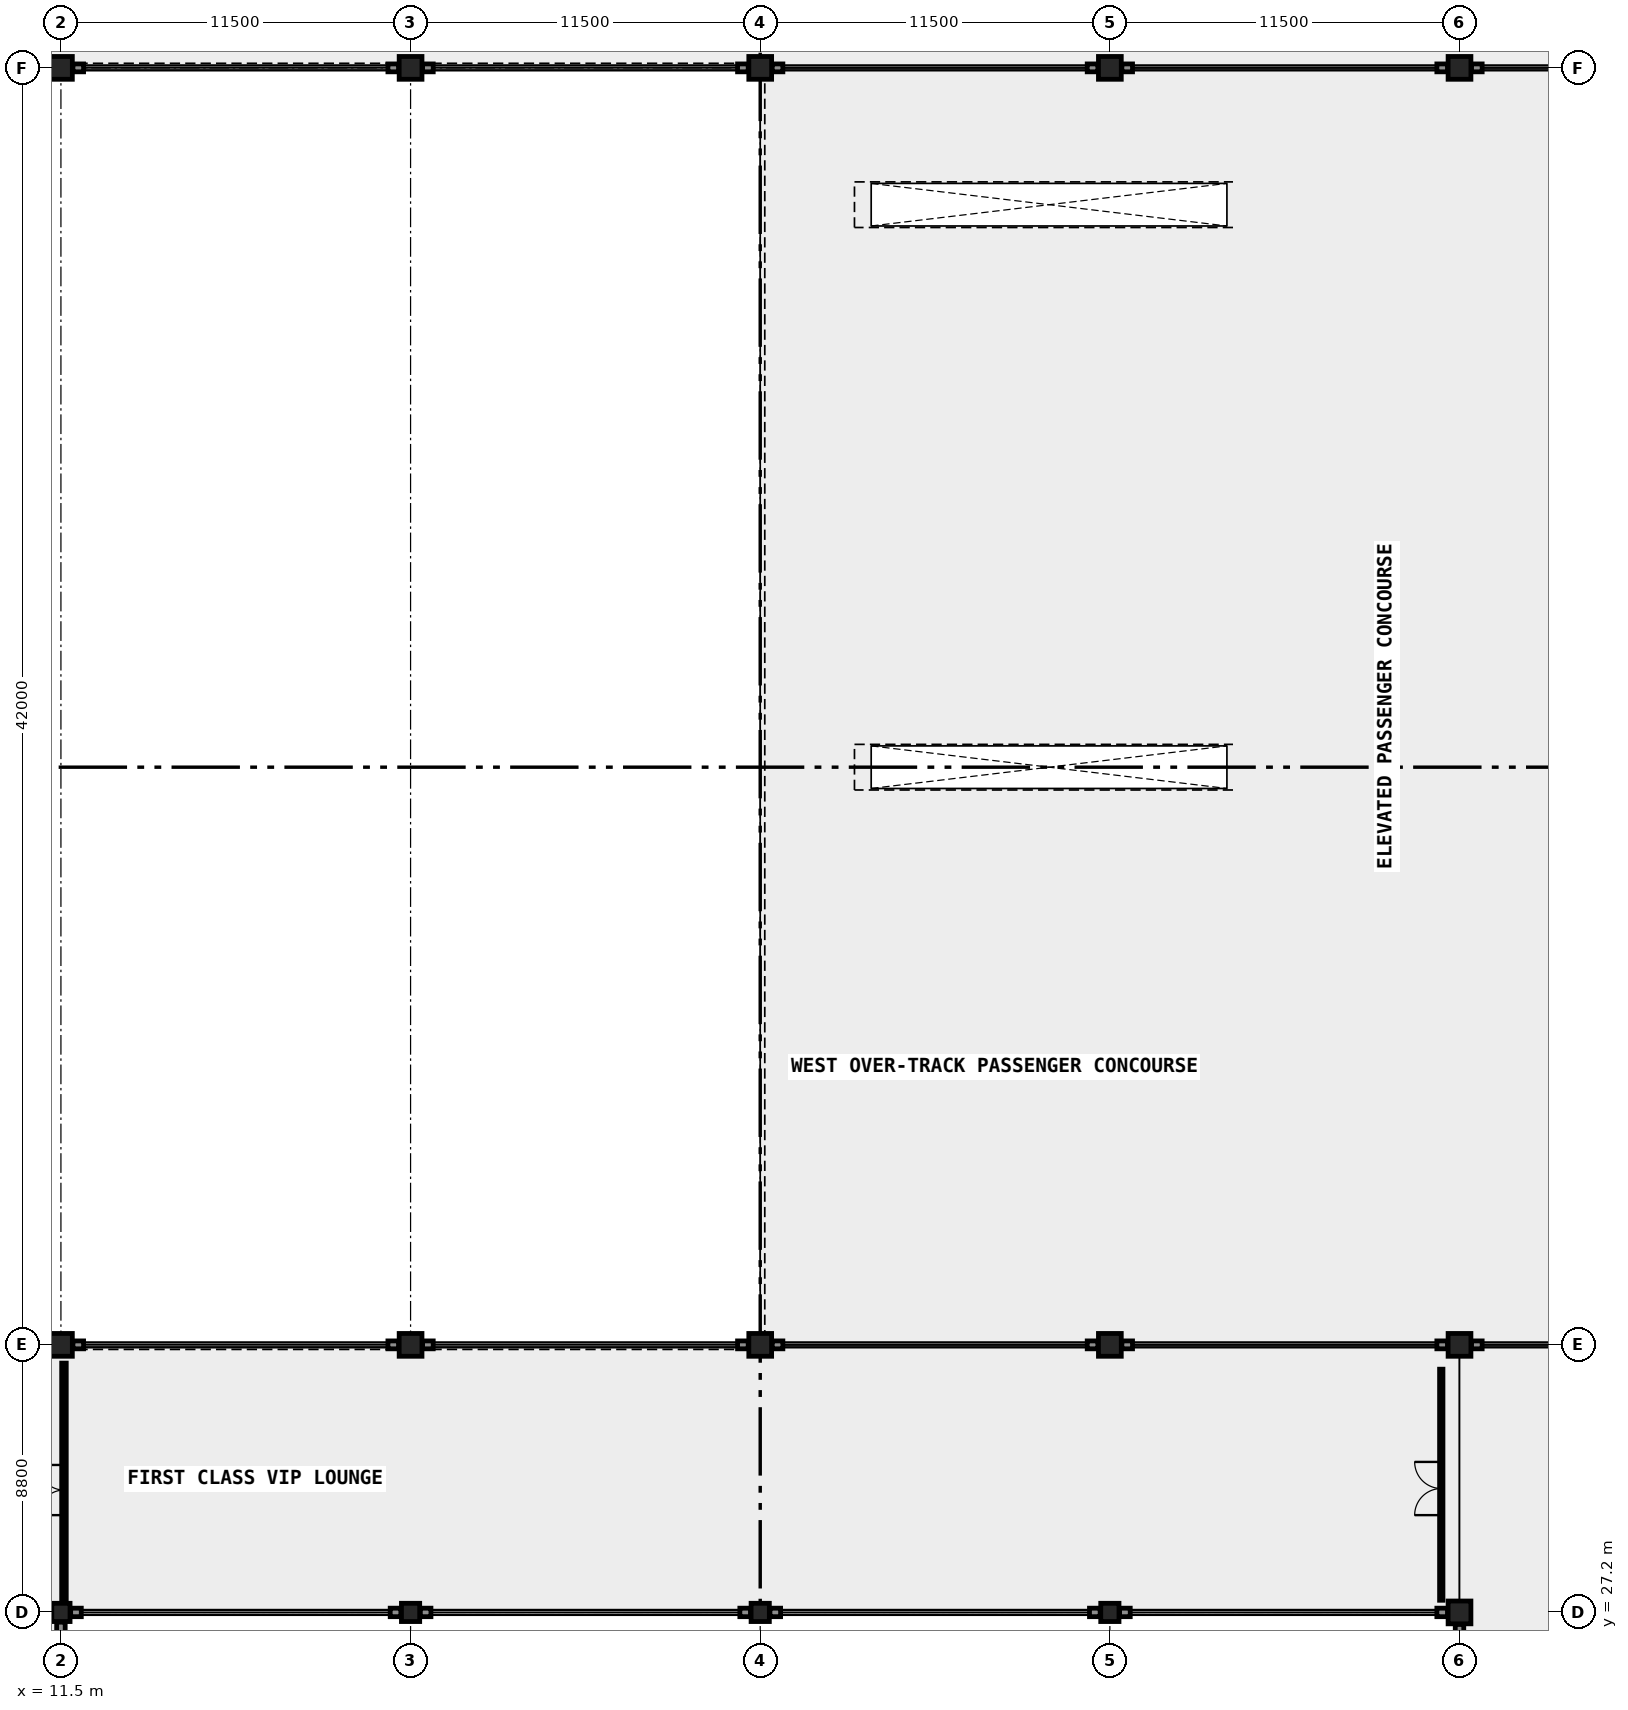
"""IFC4 building model, lengths in metres.
Left out: names, types, materials, properties, quantities, classifications, styles, units other than length and angle.
Written with IfcOpenShell. Run it as: python <this file> out.ifc"""

import sys

from ifc_helpers import new_model, si_unit, direction, frame, frame_2d, origin, origin_2d, place, context, subcontext, project, spatial, rectangle, circle, extrude, element, fill, save


model = new_model("IFC4")
c1 = context("Model", 3, precision=1e-05, world=origin(), true_north=direction((0.0, 1.0)))
c2 = subcontext(c1, "Body", "Model", "MODEL_VIEW")
j1 = project(units=[si_unit("LENGTHUNIT", "METRE"), si_unit("PLANEANGLEUNIT", "RADIAN")], contexts=[c1])
p1 = place(None, origin())
s1 = spatial("IfcSite", under=j1, at=p1, CompositionType="ELEMENT")
p2 = place(p1, origin())
s2 = spatial("IfcBuilding", under=s1, at=p2, CompositionType="ELEMENT")
p3 = place(p2, frame((0.0, 0.0, 8.4)))
s3 = spatial("IfcBuildingStorey", under=s2, at=p3, CompositionType="ELEMENT", Elevation=8.4)
p4 = place(p3, frame((11.5, 27.2, 0.0), z_axis=(0.0, 0.0, 1.0), x_axis=(1.0, 0.0, 0.0)))
e1 = element("IfcColumn", 1, at=p4, inside=s3, PredefinedType="COLUMN", context=c2, shape_type="SweptSolid", body=[
    extrude(rectangle(XDim=0.6, YDim=0.6, at=origin_2d()), origin(), (0.0, 0.0, 1.0), 5.4),
])
for number, where, z_axis, x_axis in (
    (2, (11.5, 36.0, 0.0), (0.0, 0.0, 1.0), (1.0, 0.0, 0.0)),
    (3, (11.5, 78.0, 0.0), (0.0, 0.0, 1.0), (1.0, 0.0, 0.0)),
):
    element("IfcColumn", number, at=place(p3, frame(where, z_axis=z_axis, x_axis=x_axis)), inside=s3, PredefinedType="COLUMN", context=c2, shape_type="SweptSolid", body=[
        extrude(rectangle(XDim=0.75, YDim=0.75, at=origin_2d()), origin(), (0.0, 0.0, 1.0), 5.4),
    ])
p5 = place(p3, frame((23.0, 27.2, 0.0), z_axis=(0.0, 0.0, 1.0), x_axis=(1.0, 0.0, 0.0)))
e4 = element("IfcColumn", 4, at=p5, inside=s3, PredefinedType="COLUMN", context=c2, shape_type="SweptSolid", body=[
    extrude(rectangle(XDim=0.6, YDim=0.6, at=origin_2d()), origin(), (0.0, 0.0, 1.0), 5.4),
])
for number, where, z_axis, x_axis in (
    (5, (23.0, 36.0, 0.0), (0.0, 0.0, 1.0), (1.0, 0.0, 0.0)),
    (6, (23.0, 78.0, 0.0), (0.0, 0.0, 1.0), (1.0, 0.0, 0.0)),
):
    element("IfcColumn", number, at=place(p3, frame(where, z_axis=z_axis, x_axis=x_axis)), inside=s3, PredefinedType="COLUMN", context=c2, shape_type="SweptSolid", body=[
        extrude(rectangle(XDim=0.75, YDim=0.75, at=origin_2d()), origin(), (0.0, 0.0, 1.0), 5.4),
    ])
p6 = place(p3, frame((34.5, 27.2, 0.0), z_axis=(0.0, 0.0, 1.0), x_axis=(1.0, 0.0, 0.0)))
e7 = element("IfcColumn", 7, at=p6, inside=s3, PredefinedType="COLUMN", context=c2, shape_type="SweptSolid", body=[
    extrude(rectangle(XDim=0.6, YDim=0.6, at=origin_2d()), origin(), (0.0, 0.0, 1.0), 5.4),
])
for number, where, z_axis, x_axis in (
    (8, (34.5, 36.0, 0.0), (0.0, 0.0, 1.0), (1.0, 0.0, 0.0)),
    (9, (34.5, 78.0, 0.0), (0.0, 0.0, 1.0), (1.0, 0.0, 0.0)),
):
    element("IfcColumn", number, at=place(p3, frame(where, z_axis=z_axis, x_axis=x_axis)), inside=s3, PredefinedType="COLUMN", context=c2, shape_type="SweptSolid", body=[
        extrude(rectangle(XDim=0.75, YDim=0.75, at=origin_2d()), origin(), (0.0, 0.0, 1.0), 5.4),
    ])
p7 = place(p3, frame((46.0, 27.2, 0.0), z_axis=(0.0, 0.0, 1.0), x_axis=(1.0, 0.0, 0.0)))
e10 = element("IfcColumn", 10, at=p7, inside=s3, PredefinedType="COLUMN", context=c2, shape_type="SweptSolid", body=[
    extrude(rectangle(XDim=0.6, YDim=0.6, at=origin_2d()), origin(), (0.0, 0.0, 1.0), 5.4),
])
for number, where, z_axis, x_axis in (
    (11, (46.0, 36.0, 0.0), (0.0, 0.0, 1.0), (1.0, 0.0, 0.0)),
    (12, (46.0, 78.0, 0.0), (0.0, 0.0, 1.0), (1.0, 0.0, 0.0)),
):
    element("IfcColumn", number, at=place(p3, frame(where, z_axis=z_axis, x_axis=x_axis)), inside=s3, PredefinedType="COLUMN", context=c2, shape_type="SweptSolid", body=[
        extrude(rectangle(XDim=0.75, YDim=0.75, at=origin_2d()), origin(), (0.0, 0.0, 1.0), 5.4),
    ])
p8 = place(p3, frame((57.5, 27.2, 0.0), z_axis=(0.0, 0.0, 1.0), x_axis=(1.0, 0.0, 0.0)))
e13 = element("IfcColumn", 13, at=p8, inside=s3, PredefinedType="COLUMN", context=c2, shape_type="SweptSolid", body=[
    extrude(circle(Radius=0.375, at=origin_2d()), origin(), (0.0, 0.0, 1.0), 5.4),
])
for number, where, z_axis, x_axis in (
    (14, (57.5, 36.0, 0.0), (0.0, 0.0, 1.0), (1.0, 0.0, 0.0)),
    (15, (57.5, 78.0, 0.0), (0.0, 0.0, 1.0), (1.0, 0.0, 0.0)),
):
    element("IfcColumn", number, at=place(p3, frame(where, z_axis=z_axis, x_axis=x_axis)), inside=s3, PredefinedType="COLUMN", context=c2, shape_type="SweptSolid", body=[
        extrude(rectangle(XDim=0.75, YDim=0.75, at=origin_2d()), origin(), (0.0, 0.0, 1.0), 5.4),
    ])
p9 = place(p3, frame((11.5, 17.92, 0.0), z_axis=(0.0, 0.0, 1.0), x_axis=(0.0, 1.0, 0.0)))
e16 = element("IfcWall", 16, at=p9, inside=s3, PredefinedType="SOLIDWALL", context=c2, shape_type="SweptSolid", body=[
    extrude(rectangle(XDim=8.96, YDim=0.28, at=frame_2d((4.48, 0.0))), origin(), (0.0, 0.0, 1.0), 4.25),
])
p10 = place(p9, frame((1.32, 0.0, 0.85)))
e17 = element("IfcOpeningElement", 17, at=p10, cuts=e16, PredefinedType="OPENING", context=c2, shape_type="SweptSolid", body=[
    extrude(rectangle(XDim=2.5, YDim=2.2, at=frame_2d((1.25, 1.1))), frame((0.0, 0.15, 0.0), z_axis=(0.0, -1.0, 0.0), x_axis=(1.0, 0.0, 0.0)), (0.0, 0.0, 1.0), 0.3),
])
p11 = place(p9, frame((5.14, 0.0, 0.85)))
e18 = element("IfcOpeningElement", 18, at=p11, cuts=e16, PredefinedType="OPENING", context=c2, shape_type="SweptSolid", body=[
    extrude(rectangle(XDim=2.5, YDim=2.2, at=frame_2d((1.25, 1.1))), frame((0.0, 0.15, 0.0), z_axis=(0.0, -1.0, 0.0), x_axis=(1.0, 0.0, 0.0)), (0.0, 0.0, 1.0), 0.3),
])
for number, where, z_axis, x_axis in (
    (19, (11.82, 27.2, 0.0), (0.0, 0.0, 1.0), (1.0, 0.0, 0.0)),
    (20, (22.33, 27.2, 0.0), (0.0, 0.0, 1.0), (1.0, 0.0, 0.0)),
    (21, (23.32, 27.2, 0.0), (0.0, 0.0, 1.0), (1.0, 0.0, 0.0)),
    (22, (33.83, 27.2, 0.0), (0.0, 0.0, 1.0), (1.0, 0.0, 0.0)),
    (23, (34.82, 27.2, 0.0), (0.0, 0.0, 1.0), (1.0, 0.0, 0.0)),
    (24, (45.33, 27.2, 0.0), (0.0, 0.0, 1.0), (1.0, 0.0, 0.0)),
    (25, (46.32, 27.2, 0.0), (0.0, 0.0, 1.0), (1.0, 0.0, 0.0)),
):
    element("IfcWall", number, at=place(p3, frame(where, z_axis=z_axis, x_axis=x_axis)), inside=s3, PredefinedType="SOLIDWALL", context=c2, shape_type="SweptSolid", body=[
        extrude(rectangle(XDim=0.35, YDim=0.28, at=frame_2d((0.175, 0.0))), origin(), (0.0, 0.0, 1.0), 5.14),
    ])
p12 = place(p3, frame((56.755, 27.2, 0.0), z_axis=(0.0, 0.0, 1.0), x_axis=(1.0, 0.0, 0.0)))
e26 = element("IfcWall", 26, at=p12, inside=s3, PredefinedType="SOLIDWALL", context=c2, shape_type="SweptSolid", body=[
    extrude(rectangle(XDim=0.35, YDim=0.28, at=frame_2d((0.175, 0.0))), origin(), (0.0, 0.0, 1.0), 5.14),
])
p13 = place(p3, frame((57.5, 17.995, 0.0), z_axis=(0.0, 0.0, 1.0), x_axis=(0.0, 1.0, 0.0)))
e27 = element("IfcWall", 27, at=p13, inside=s3, PredefinedType="SOLIDWALL", context=c2, shape_type="SweptSolid", body=[
    extrude(rectangle(XDim=8.81, YDim=0.28, at=frame_2d((4.405, 0.0))), origin(), (0.0, 0.0, 1.0), 4.25),
])
p14 = place(p13, frame((2.237, 0.0, 0.85)))
e28 = element("IfcOpeningElement", 28, at=p14, cuts=e27, PredefinedType="OPENING", context=c2, shape_type="SweptSolid", body=[
    extrude(rectangle(XDim=1.05, YDim=2.05, at=frame_2d((0.525, 1.025))), frame((0.0, 0.15, 0.0), z_axis=(0.0, -1.0, 0.0), x_axis=(1.0, 0.0, 0.0)), (0.0, 0.0, 1.0), 0.3),
])
p15 = place(p13, frame((5.523, 0.0, 0.85)))
e29 = element("IfcOpeningElement", 29, at=p15, cuts=e27, PredefinedType="OPENING", context=c2, shape_type="SweptSolid", body=[
    extrude(rectangle(XDim=1.05, YDim=2.05, at=frame_2d((0.525, 1.025))), frame((0.0, 0.15, 0.0), z_axis=(0.0, -1.0, 0.0), x_axis=(1.0, 0.0, 0.0)), (0.0, 0.0, 1.0), 0.3),
])
for number, where, z_axis, x_axis in (
    (30, (11.895, 36.0, 0.0), (0.0, 0.0, 1.0), (1.0, 0.0, 0.0)),
    (31, (22.255, 36.0, 0.0), (0.0, 0.0, 1.0), (1.0, 0.0, 0.0)),
    (32, (11.895, 78.0, 0.0), (0.0, 0.0, 1.0), (1.0, 0.0, 0.0)),
    (33, (22.255, 78.0, 0.0), (0.0, 0.0, 1.0), (1.0, 0.0, 0.0)),
    (34, (23.395, 36.0, 0.0), (0.0, 0.0, 1.0), (1.0, 0.0, 0.0)),
    (35, (33.755, 36.0, 0.0), (0.0, 0.0, 1.0), (1.0, 0.0, 0.0)),
    (36, (23.395, 78.0, 0.0), (0.0, 0.0, 1.0), (1.0, 0.0, 0.0)),
    (37, (33.755, 78.0, 0.0), (0.0, 0.0, 1.0), (1.0, 0.0, 0.0)),
    (38, (34.895, 36.0, 0.0), (0.0, 0.0, 1.0), (1.0, 0.0, 0.0)),
    (39, (45.255, 36.0, 0.0), (0.0, 0.0, 1.0), (1.0, 0.0, 0.0)),
    (40, (34.895, 78.0, 0.0), (0.0, 0.0, 1.0), (1.0, 0.0, 0.0)),
    (41, (45.255, 78.0, 0.0), (0.0, 0.0, 1.0), (1.0, 0.0, 0.0)),
    (42, (46.395, 36.0, 0.0), (0.0, 0.0, 1.0), (1.0, 0.0, 0.0)),
    (43, (56.755, 36.0, 0.0), (0.0, 0.0, 1.0), (1.0, 0.0, 0.0)),
    (44, (46.395, 78.0, 0.0), (0.0, 0.0, 1.0), (1.0, 0.0, 0.0)),
    (45, (56.755, 78.0, 0.0), (0.0, 0.0, 1.0), (1.0, 0.0, 0.0)),
    (46, (57.895, 36.0, 0.0), (0.0, 0.0, 1.0), (1.0, 0.0, 0.0)),
    (47, (57.895, 78.0, 0.0), (0.0, 0.0, 1.0), (1.0, 0.0, 0.0)),
):
    element("IfcWall", number, at=place(p3, frame(where, z_axis=z_axis, x_axis=x_axis)), inside=s3, PredefinedType="SOLIDWALL", context=c2, shape_type="SweptSolid", body=[
        extrude(rectangle(XDim=0.35, YDim=0.26, at=frame_2d((0.175, 0.0))), origin(), (0.0, 0.0, 1.0), 5.1),
    ])
p16 = place(p3, frame((56.9, 27.6, 0.0), z_axis=(0.0, 0.0, 1.0), x_axis=(0.0, 1.0, 0.0)))
e48 = element("IfcWall", 48, at=p16, inside=s3, PredefinedType="MOVABLE", context=c2, shape_type="SweptSolid", body=[
    extrude(rectangle(XDim=7.6, YDim=0.11, at=frame_2d((3.8, 0.0))), origin(), (0.0, 0.0, 1.0), 5.12),
])
p17 = place(p16, frame((2.8, 0.0, 0.0)))
e49 = element("IfcOpeningElement", 49, at=p17, cuts=e48, PredefinedType="OPENING", context=c2, shape_type="SweptSolid", body=[
    extrude(rectangle(XDim=1.75, YDim=2.3, at=frame_2d((0.875, 1.15))), frame((0.0, 0.065, 0.0), z_axis=(0.0, -1.0, 0.0), x_axis=(1.0, 0.0, 0.0)), (0.0, 0.0, 1.0), 0.13),
])
p18 = place(p3, frame((11.6, 27.6, 0.0), z_axis=(0.0, 0.0, 1.0), x_axis=(0.0, 1.0, 0.0)))
e50 = element("IfcWall", 50, at=p18, inside=s3, PredefinedType="PARTITIONING", context=c2, shape_type="SweptSolid", body=[
    extrude(rectangle(XDim=7.8, YDim=0.15, at=frame_2d((3.9, 0.0))), origin(), (0.0, 0.0, 1.0), 4.25),
])
p19 = place(p18, frame((2.8, 0.0, 0.0)))
e51 = element("IfcOpeningElement", 51, at=p19, cuts=e50, PredefinedType="OPENING", context=c2, shape_type="SweptSolid", body=[
    extrude(rectangle(XDim=1.65, YDim=2.2, at=frame_2d((0.825, 1.1))), frame((0.0, 0.085, 0.0), z_axis=(0.0, -1.0, 0.0), x_axis=(1.0, 0.0, 0.0)), (0.0, 0.0, 1.0), 0.17),
])
p20 = place(p17, origin())
e52 = element("IfcDoor", 52, at=p20, inside=s3, OperationType="DOUBLE_DOOR_SINGLE_SWING", PredefinedType="DOOR", context=c2, shape_type="SweptSolid", body=[
    extrude(rectangle(XDim=1.75, YDim=2.3, at=frame_2d((0.875, 1.15))), frame((0.0, 0.025, 0.0), z_axis=(0.0, -1.0, 0.0), x_axis=(1.0, 0.0, 0.0)), (0.0, 0.0, 1.0), 0.05),
])
fill(e49, e52)
p21 = place(p19, origin())
e53 = element("IfcDoor", 53, at=p21, inside=s3, OperationType="DOUBLE_DOOR_SINGLE_SWING", PredefinedType="DOOR", context=c2, shape_type="SweptSolid", body=[
    extrude(rectangle(XDim=1.65, YDim=2.2, at=frame_2d((0.825, 1.1))), frame((0.0, 0.025, 0.0), z_axis=(0.0, -1.0, 0.0), x_axis=(1.0, 0.0, 0.0)), (0.0, 0.0, 1.0), 0.05),
])
fill(e51, e53)
save(model, sys.argv[1])
